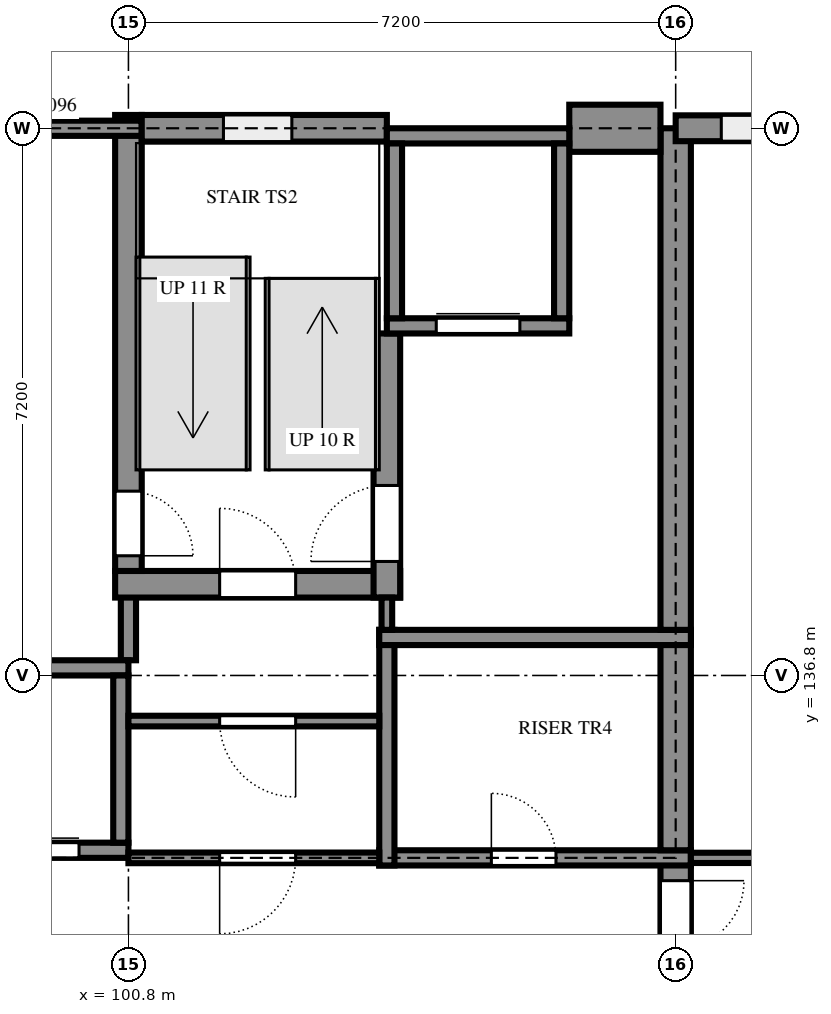
"""IFC4 building model, lengths in metres.
Left out: names, types, materials, properties, quantities, classifications, styles, units other than length and angle.
Written with IfcOpenShell. Run it as: python <this file> out.ifc"""

import sys

from ifc_helpers import new_model, si_unit, direction, frame, frame_2d, origin, place, context, subcontext, project, spatial, rectangle, extrude, element, fill, save


model = new_model("IFC4")
c1 = context("Model", 3, precision=1e-05, world=origin(), true_north=direction((0.0, 1.0)))
c2 = subcontext(c1, "Body", "Model", "MODEL_VIEW")
j1 = project(units=[si_unit("LENGTHUNIT", "METRE"), si_unit("PLANEANGLEUNIT", "RADIAN")], contexts=[c1])
p1 = place(None, origin())
s1 = spatial("IfcSite", under=j1, at=p1, CompositionType="ELEMENT")
p2 = place(p1, origin())
s2 = spatial("IfcBuilding", under=s1, at=p2, CompositionType="ELEMENT")
p3 = place(p2, frame((0.0, 0.0, 21.6)))
s3 = spatial("IfcBuildingStorey", under=s2, at=p3, CompositionType="ELEMENT", Elevation=21.6)
p4 = place(p3, frame((108.0, 132.0, 0.0), z_axis=(0.0, 0.0, 1.0), x_axis=(0.0, 1.0, 0.0)))
e1 = element("IfcWall", 1, at=p4, inside=s3, PredefinedType="SHEAR", context=c2, shape_type="SweptSolid", body=[
    extrude(rectangle(XDim=2.5, YDim=0.4, at=frame_2d((1.25, 0.0))), origin(), (0.0, 0.0, 1.0), 3.6),
])
p5 = place(p4, frame((0.3, 0.0, 0.0)))
e2 = element("IfcOpeningElement", 2, at=p5, cuts=e1, PredefinedType="OPENING", context=c2, shape_type="SweptSolid", body=[
    extrude(rectangle(XDim=1.8, YDim=2.1, at=frame_2d((0.9, 1.05))), frame((0.0, 0.21, 0.0), z_axis=(0.0, -1.0, 0.0), x_axis=(1.0, 0.0, 0.0)), (0.0, 0.0, 1.0), 0.42),
])
p6 = place(p3, frame((104.1, 134.4, 0.0), z_axis=(0.0, 0.0, 1.0), x_axis=(1.0, 0.0, 0.0)))
e3 = element("IfcWall", 3, at=p6, inside=s3, PredefinedType="SHEAR", context=c2, shape_type="SweptSolid", body=[
    extrude(rectangle(XDim=4.1, YDim=0.2, at=frame_2d((2.05, 0.0))), origin(), (0.0, 0.0, 1.0), 3.6),
])
p7 = place(p6, frame((1.475, 0.0, 0.0)))
e4 = element("IfcOpeningElement", 4, at=p7, cuts=e3, PredefinedType="OPENING", context=c2, shape_type="SweptSolid", body=[
    extrude(rectangle(XDim=0.85, YDim=2.1, at=frame_2d((0.425, 1.05))), frame((0.0, 0.11, 0.0), z_axis=(0.0, -1.0, 0.0), x_axis=(1.0, 0.0, 0.0)), (0.0, 0.0, 1.0), 0.22),
])
p8 = place(p3, frame((108.0, 134.5, 0.0), z_axis=(0.0, 0.0, 1.0), x_axis=(0.0, 1.0, 0.0)))
e5 = element("IfcWall", 5, at=p8, inside=s3, PredefinedType="SHEAR", context=c2, shape_type="SweptSolid", body=[
    extrude(rectangle(XDim=2.9, YDim=0.4, at=frame_2d((1.45, 0.0))), origin(), (0.0, 0.0, 1.0), 3.6),
])
p9 = place(p3, frame((100.8, 137.0, 0.0), z_axis=(0.0, 0.0, 1.0), x_axis=(0.0, 1.0, 0.0)))
e6 = element("IfcWall", 6, at=p9, inside=s3, PredefinedType="SHEAR", context=c2, shape_type="SweptSolid", body=[
    extrude(rectangle(XDim=1.175, YDim=0.2, at=frame_2d((0.587, 0.0))), origin(), (0.0, 0.0, 1.0), 3.6),
])
p10 = place(p3, frame((104.2, 137.4, 0.0), z_axis=(0.0, 0.0, 1.0), x_axis=(0.0, -1.0, 0.0)))
e7 = element("IfcWall", 7, at=p10, inside=s3, PredefinedType="SHEAR", context=c2, shape_type="SweptSolid", body=[
    extrude(rectangle(XDim=3.1, YDim=0.2, at=frame_2d((1.55, 0.0))), origin(), (0.0, 0.0, 1.0), 3.6),
])
p11 = place(p3, frame((108.2, 137.3, 0.0), z_axis=(0.0, 0.0, 1.0), x_axis=(-1.0, 0.0, 0.0)))
e8 = element("IfcWall", 8, at=p11, inside=s3, PredefinedType="SHEAR", context=c2, shape_type="SweptSolid", body=[
    extrude(rectangle(XDim=4.1, YDim=0.2, at=frame_2d((2.05, 0.0))), origin(), (0.0, 0.0, 1.0), 3.6),
])
p12 = place(p3, frame((108.0, 137.4, 0.0), z_axis=(0.0, 0.0, 1.0), x_axis=(0.0, 1.0, 0.0)))
e9 = element("IfcWall", 9, at=p12, inside=s3, PredefinedType="SHEAR", context=c2, shape_type="SweptSolid", body=[
    extrude(rectangle(XDim=6.6, YDim=0.4, at=frame_2d((3.3, 0.0))), origin(), (0.0, 0.0, 1.0), 3.6),
])
p13 = place(p3, frame((100.625, 138.0, 0.0), z_axis=(0.0, 0.0, 1.0), x_axis=(1.0, 0.0, 0.0)))
e10 = element("IfcWall", 10, at=p13, inside=s3, PredefinedType="SHEAR", context=c2, shape_type="SweptSolid", body=[
    extrude(rectangle(XDim=3.75, YDim=0.35, at=frame_2d((1.875, 0.0))), origin(), (0.0, 0.0, 1.0), 3.6),
])
p14 = place(p13, frame((1.375, 0.0, 0.0)))
e11 = element("IfcOpeningElement", 11, at=p14, cuts=e10, PredefinedType="OPENING", context=c2, shape_type="SweptSolid", body=[
    extrude(rectangle(XDim=1.0, YDim=2.1, at=frame_2d((0.5, 1.05))), frame((0.0, 0.185, 0.0), z_axis=(0.0, -1.0, 0.0), x_axis=(1.0, 0.0, 0.0)), (0.0, 0.0, 1.0), 0.37),
])
p15 = place(p3, frame((104.2, 137.825, 0.0), z_axis=(0.0, 0.0, 1.0), x_axis=(0.0, 1.0, 0.0)))
e12 = element("IfcWall", 12, at=p15, inside=s3, PredefinedType="SHEAR", context=c2, shape_type="SweptSolid", body=[
    extrude(rectangle(XDim=3.475, YDim=0.35, at=frame_2d((1.738, 0.0))), origin(), (0.0, 0.0, 1.0), 3.6),
])
p16 = place(p15, frame((0.475, 0.0, 0.0)))
e13 = element("IfcOpeningElement", 13, at=p16, cuts=e12, PredefinedType="OPENING", context=c2, shape_type="SweptSolid", body=[
    extrude(rectangle(XDim=1.0, YDim=2.1, at=frame_2d((0.5, 1.05))), frame((0.0, 0.185, 0.0), z_axis=(0.0, -1.0, 0.0), x_axis=(1.0, 0.0, 0.0)), (0.0, 0.0, 1.0), 0.37),
])
p17 = place(p3, frame((100.8, 144.175, 0.0), z_axis=(0.0, 0.0, 1.0), x_axis=(0.0, -1.0, 0.0)))
e14 = element("IfcWall", 14, at=p17, inside=s3, PredefinedType="SHEAR", context=c2, shape_type="SweptSolid", body=[
    extrude(rectangle(XDim=6.0, YDim=0.35, at=frame_2d((3.0, 0.0))), origin(), (0.0, 0.0, 1.0), 3.6),
])
p18 = place(p17, frame((4.95, 0.0, 0.0)))
e15 = element("IfcOpeningElement", 15, at=p18, cuts=e14, PredefinedType="OPENING", context=c2, shape_type="SweptSolid", body=[
    extrude(rectangle(XDim=0.85, YDim=2.1, at=frame_2d((0.425, 1.05))), frame((0.0, 0.185, 0.0), z_axis=(0.0, -1.0, 0.0), x_axis=(1.0, 0.0, 0.0)), (0.0, 0.0, 1.0), 0.37),
])
p19 = place(p3, frame((100.975, 144.0, 0.0), z_axis=(0.0, 0.0, 1.0), x_axis=(-1.0, 0.0, 0.0)))
e16 = element("IfcWall", 16, at=p19, inside=s3, PredefinedType="SHEAR", context=c2, shape_type="SweptSolid", body=[
    extrude(rectangle(XDim=7.575, YDim=0.2, at=frame_2d((3.788, 0.0))), origin(), (0.0, 0.0, 1.0), 3.6),
])
p20 = place(p3, frame((104.2, 144.0, 0.0), z_axis=(0.0, 0.0, 1.0), x_axis=(-1.0, 0.0, 0.0)))
e17 = element("IfcWall", 17, at=p20, inside=s3, PredefinedType="SHEAR", context=c2, shape_type="SweptSolid", body=[
    extrude(rectangle(XDim=3.225, YDim=0.35, at=frame_2d((1.612, 0.0))), origin(), (0.0, 0.0, 1.0), 3.6),
])
p21 = place(p20, frame((1.25, 0.0, 0.6)))
e18 = element("IfcOpeningElement", 18, at=p21, cuts=e17, PredefinedType="OPENING", context=c2, shape_type="SweptSolid", body=[
    extrude(rectangle(XDim=0.9, YDim=2.1, at=frame_2d((0.45, 1.05))), frame((0.0, 0.185, 0.0), z_axis=(0.0, -1.0, 0.0), x_axis=(1.0, 0.0, 0.0)), (0.0, 0.0, 1.0), 0.37),
])
p22 = place(p3, frame((115.046, 144.0, 0.0), z_axis=(0.0, 0.0, 1.0), x_axis=(-1.0, 0.0, 0.0)))
e19 = element("IfcWall", 19, at=p22, inside=s3, PredefinedType="SOLIDWALL", context=c2, shape_type="SweptSolid", body=[
    extrude(rectangle(XDim=7.046, YDim=0.34, at=frame_2d((3.523, 0.0))), origin(), (0.0, 0.0, 1.0), 3.16),
])
p23 = place(p22, frame((4.046, 0.0, 0.9)))
e20 = element("IfcOpeningElement", 20, at=p23, cuts=e19, PredefinedType="OPENING", context=c2, shape_type="SweptSolid", body=[
    extrude(rectangle(XDim=2.4, YDim=1.8, at=frame_2d((1.2, 0.9))), frame((0.0, 0.18, 0.0), z_axis=(0.0, -1.0, 0.0), x_axis=(1.0, 0.0, 0.0)), (0.0, 0.0, 1.0), 0.36),
])
p24 = place(p22, frame((0.447, 0.0, 0.9)))
e21 = element("IfcOpeningElement", 21, at=p24, cuts=e19, PredefinedType="OPENING", context=c2, shape_type="SweptSolid", body=[
    extrude(rectangle(XDim=2.4, YDim=1.8, at=frame_2d((1.2, 0.9))), frame((0.0, 0.18, 0.0), z_axis=(0.0, -1.0, 0.0), x_axis=(1.0, 0.0, 0.0)), (0.0, 0.0, 1.0), 0.36),
])
p25 = place(p3, frame((107.8, 144.0, 0.0), z_axis=(0.0, 0.0, 1.0), x_axis=(-1.0, 0.0, 0.0)))
e22 = element("IfcWall", 22, at=p25, inside=s3, PredefinedType="SOLIDWALL", context=c2, shape_type="SweptSolid", body=[
    extrude(rectangle(XDim=1.2, YDim=0.62, at=frame_2d((0.6, 0.0))), origin(), (0.0, 0.0, 1.0), 3.46),
])
p26 = place(p3, frame((98.4, 134.5, 0.0), z_axis=(0.0, 0.0, 1.0), x_axis=(1.0, 0.0, 0.0)))
e23 = element("IfcWall", 23, at=p26, inside=s3, PredefinedType="SHEAR", context=c2, shape_type="SweptSolid", body=[
    extrude(rectangle(XDim=2.4, YDim=0.2, at=frame_2d((1.2, 0.0))), origin(), (0.0, 0.0, 1.0), 3.6),
])
p27 = place(p26, frame((0.65, 0.0, 0.0)))
e24 = element("IfcOpeningElement", 24, at=p27, cuts=e23, PredefinedType="OPENING", context=c2, shape_type="SweptSolid", body=[
    extrude(rectangle(XDim=1.1, YDim=2.1, at=frame_2d((0.55, 1.05))), frame((0.0, 0.11, 0.0), z_axis=(0.0, -1.0, 0.0), x_axis=(1.0, 0.0, 0.0)), (0.0, 0.0, 1.0), 0.22),
])
p28 = place(p3, frame((98.4, 136.9, 0.0), z_axis=(0.0, 0.0, 1.0), x_axis=(1.0, 0.0, 0.0)))
e25 = element("IfcWall", 25, at=p28, inside=s3, PredefinedType="SHEAR", context=c2, shape_type="SweptSolid", body=[
    extrude(rectangle(XDim=2.4, YDim=0.2, at=frame_2d((1.2, 0.0))), origin(), (0.0, 0.0, 1.0), 3.6),
])
p29 = place(p3, frame((100.7, 134.6, 0.0), z_axis=(0.0, 0.0, 1.0), x_axis=(0.0, 1.0, 0.0)))
e26 = element("IfcWall", 26, at=p29, inside=s3, PredefinedType="SHEAR", context=c2, shape_type="SweptSolid", body=[
    extrude(rectangle(XDim=2.2, YDim=0.2, at=frame_2d((1.1, 0.0))), origin(), (0.0, 0.0, 1.0), 3.6),
])
p30 = place(p3, frame((104.2, 141.4, 0.0), z_axis=(0.0, 0.0, 1.0), x_axis=(1.0, 0.0, 0.0)))
e27 = element("IfcWall", 27, at=p30, inside=s3, PredefinedType="SHEAR", context=c2, shape_type="SweptSolid", body=[
    extrude(rectangle(XDim=2.4, YDim=0.2, at=frame_2d((1.2, 0.0))), origin(), (0.0, 0.0, 1.0), 3.6),
])
p31 = place(p30, frame((0.65, 0.0, 0.0)))
e28 = element("IfcOpeningElement", 28, at=p31, cuts=e27, PredefinedType="OPENING", context=c2, shape_type="SweptSolid", body=[
    extrude(rectangle(XDim=1.1, YDim=2.1, at=frame_2d((0.55, 1.05))), frame((0.0, 0.11, 0.0), z_axis=(0.0, -1.0, 0.0), x_axis=(1.0, 0.0, 0.0)), (0.0, 0.0, 1.0), 0.22),
])
p32 = place(p3, frame((104.2, 143.9, 0.0), z_axis=(0.0, 0.0, 1.0), x_axis=(1.0, 0.0, 0.0)))
e29 = element("IfcWall", 29, at=p32, inside=s3, PredefinedType="SHEAR", context=c2, shape_type="SweptSolid", body=[
    extrude(rectangle(XDim=2.4, YDim=0.2, at=frame_2d((1.2, 0.0))), origin(), (0.0, 0.0, 1.0), 3.6),
])
for number, where, z_axis, x_axis in (
    (30, (104.3, 141.5, 0.0), (0.0, 0.0, 1.0), (0.0, 1.0, 0.0)),
    (31, (106.5, 141.5, 0.0), (0.0, 0.0, 1.0), (0.0, 1.0, 0.0)),
):
    element("IfcWall", number, at=place(p3, frame(where, z_axis=z_axis, x_axis=x_axis)), inside=s3, PredefinedType="SHEAR", context=c2, shape_type="SweptSolid", body=[
        extrude(rectangle(XDim=2.3, YDim=0.2, at=frame_2d((1.15, 0.0))), origin(), (0.0, 0.0, 1.0), 3.6),
    ])
p33 = place(p3, frame((100.8, 134.4, 0.0), z_axis=(0.0, 0.0, 1.0), x_axis=(1.0, 0.0, 0.0)))
e32 = element("IfcWall", 32, at=p33, inside=s3, PredefinedType="PARTITIONING", context=c2, shape_type="SweptSolid", body=[
    extrude(rectangle(XDim=3.3, YDim=0.14, at=frame_2d((1.65, 0.0))), origin(), (0.0, 0.0, 1.0), 3.46),
])
p34 = place(p33, frame((1.2, 0.0, 0.0)))
e33 = element("IfcOpeningElement", 33, at=p34, cuts=e32, PredefinedType="OPENING", context=c2, shape_type="SweptSolid", body=[
    extrude(rectangle(XDim=1.0, YDim=2.1, at=frame_2d((0.5, 1.05))), frame((0.0, 0.08, 0.0), z_axis=(0.0, -1.0, 0.0), x_axis=(1.0, 0.0, 0.0)), (0.0, 0.0, 1.0), 0.16),
])
p35 = place(p3, frame((108.2, 134.4, 0.0), z_axis=(0.0, 0.0, 1.0), x_axis=(1.0, 0.0, 0.0)))
e34 = element("IfcWall", 34, at=p35, inside=s3, PredefinedType="PARTITIONING", context=c2, shape_type="SweptSolid", body=[
    extrude(rectangle(XDim=25.07, YDim=0.135, at=frame_2d((12.535, 0.0))), origin(), (0.0, 0.0, 1.0), 3.16),
])
p36 = place(p35, frame((22.7, 0.0, 0.0)))
e35 = element("IfcOpeningElement", 35, at=p36, cuts=e34, PredefinedType="OPENING", context=c2, shape_type="SweptSolid", body=[
    extrude(rectangle(XDim=1.0, YDim=2.4, at=frame_2d((0.5, 1.2))), frame((0.0, 0.077, 0.0), z_axis=(0.0, -1.0, 0.0), x_axis=(1.0, 0.0, 0.0)), (0.0, 0.0, 1.0), 0.155),
])
p37 = place(p3, frame((100.8, 136.2, 0.0), z_axis=(0.0, 0.0, 1.0), x_axis=(1.0, 0.0, 0.0)))
e36 = element("IfcWall", 36, at=p37, inside=s3, PredefinedType="PARTITIONING", context=c2, shape_type="SweptSolid", body=[
    extrude(rectangle(XDim=3.3, YDim=0.14, at=frame_2d((1.65, 0.0))), origin(), (0.0, 0.0, 1.0), 3.46),
])
p38 = place(p37, frame((1.2, 0.0, 0.0)))
e37 = element("IfcOpeningElement", 37, at=p38, cuts=e36, PredefinedType="OPENING", context=c2, shape_type="SweptSolid", body=[
    extrude(rectangle(XDim=1.0, YDim=2.1, at=frame_2d((0.5, 1.05))), frame((0.0, 0.08, 0.0), z_axis=(0.0, -1.0, 0.0), x_axis=(1.0, 0.0, 0.0)), (0.0, 0.0, 1.0), 0.16),
])
p39 = place(p3, frame((104.2, 137.4, 0.0), z_axis=(0.0, 0.0, 1.0), x_axis=(0.0, 1.0, 0.0)))
e38 = element("IfcWall", 38, at=p39, inside=s3, PredefinedType="PARTITIONING", context=c2, shape_type="SweptSolid", body=[
    extrude(rectangle(XDim=0.425, YDim=0.14, at=frame_2d((0.212, 0.0))), origin(), (0.0, 0.0, 1.0), 3.46),
])
p40 = place(p23, origin())
e39 = element("IfcWindow", 39, at=p40, inside=s3, PartitioningType="SINGLE_PANEL", PredefinedType="WINDOW", context=c2, shape_type="SweptSolid", body=[
    extrude(rectangle(XDim=2.4, YDim=1.8, at=frame_2d((1.2, 0.9))), frame((0.0, 0.03, 0.0), z_axis=(0.0, -1.0, 0.0), x_axis=(1.0, 0.0, 0.0)), (0.0, 0.0, 1.0), 0.06),
])
fill(e20, e39)
p41 = place(p21, origin())
e40 = element("IfcWindow", 40, at=p41, inside=s3, PartitioningType="SINGLE_PANEL", PredefinedType="WINDOW", context=c2, shape_type="SweptSolid", body=[
    extrude(rectangle(XDim=0.9, YDim=2.1, at=frame_2d((0.45, 1.05))), frame((0.0, 0.03, 0.0), z_axis=(0.0, -1.0, 0.0), x_axis=(1.0, 0.0, 0.0)), (0.0, 0.0, 1.0), 0.06),
])
fill(e18, e40)
p42 = place(p27, origin())
e41 = element("IfcDoor", 41, at=p42, inside=s3, OperationType="SLIDING_TO_LEFT", PredefinedType="DOOR", context=c2, shape_type="SweptSolid", body=[
    extrude(rectangle(XDim=1.1, YDim=2.1, at=frame_2d((0.55, 1.05))), frame((0.0, 0.025, 0.0), z_axis=(0.0, -1.0, 0.0), x_axis=(1.0, 0.0, 0.0)), (0.0, 0.0, 1.0), 0.05),
])
fill(e24, e41)
p43 = place(p31, origin())
e42 = element("IfcDoor", 42, at=p43, inside=s3, OperationType="SLIDING_TO_LEFT", PredefinedType="DOOR", context=c2, shape_type="SweptSolid", body=[
    extrude(rectangle(XDim=1.1, YDim=2.1, at=frame_2d((0.55, 1.05))), frame((0.0, 0.025, 0.0), z_axis=(0.0, -1.0, 0.0), x_axis=(1.0, 0.0, 0.0)), (0.0, 0.0, 1.0), 0.05),
])
fill(e28, e42)
p44 = place(p34, frame((1.0, 0.0, 0.0), z_axis=(0.0, 0.0, 1.0), x_axis=(-1.0, 0.0, 0.0)))
e43 = element("IfcDoor", 43, at=p44, inside=s3, OperationType="SINGLE_SWING_LEFT", PredefinedType="DOOR", context=c2, shape_type="SweptSolid", body=[
    extrude(rectangle(XDim=1.0, YDim=2.1, at=frame_2d((0.5, 1.05))), frame((0.0, 0.025, 0.0), z_axis=(0.0, -1.0, 0.0), x_axis=(1.0, 0.0, 0.0)), (0.0, 0.0, 1.0), 0.05),
])
fill(e33, e43)
p45 = place(p38, frame((1.0, 0.0, 0.0), z_axis=(0.0, 0.0, 1.0), x_axis=(-1.0, 0.0, 0.0)))
e44 = element("IfcDoor", 44, at=p45, inside=s3, OperationType="SINGLE_SWING_RIGHT", PredefinedType="DOOR", context=c2, shape_type="SweptSolid", body=[
    extrude(rectangle(XDim=1.0, YDim=2.1, at=frame_2d((0.5, 1.05))), frame((0.0, 0.025, 0.0), z_axis=(0.0, -1.0, 0.0), x_axis=(1.0, 0.0, 0.0)), (0.0, 0.0, 1.0), 0.05),
])
fill(e37, e44)
p46 = place(p7, origin())
e45 = element("IfcDoor", 45, at=p46, inside=s3, OperationType="SINGLE_SWING_RIGHT", PredefinedType="DOOR", context=c2, shape_type="SweptSolid", body=[
    extrude(rectangle(XDim=0.85, YDim=2.1, at=frame_2d((0.425, 1.05))), frame((0.0, 0.025, 0.0), z_axis=(0.0, -1.0, 0.0), x_axis=(1.0, 0.0, 0.0)), (0.0, 0.0, 1.0), 0.05),
])
fill(e4, e45)
p47 = place(p14, origin())
e46 = element("IfcDoor", 46, at=p47, inside=s3, OperationType="SINGLE_SWING_RIGHT", PredefinedType="DOOR", context=c2, shape_type="SweptSolid", body=[
    extrude(rectangle(XDim=1.0, YDim=2.1, at=frame_2d((0.5, 1.05))), frame((0.0, 0.025, 0.0), z_axis=(0.0, -1.0, 0.0), x_axis=(1.0, 0.0, 0.0)), (0.0, 0.0, 1.0), 0.05),
])
fill(e11, e46)
p48 = place(p18, origin())
e47 = element("IfcDoor", 47, at=p48, inside=s3, OperationType="SINGLE_SWING_LEFT", PredefinedType="DOOR", context=c2, shape_type="SweptSolid", body=[
    extrude(rectangle(XDim=0.85, YDim=2.1, at=frame_2d((0.425, 1.05))), frame((0.0, 0.025, 0.0), z_axis=(0.0, -1.0, 0.0), x_axis=(1.0, 0.0, 0.0)), (0.0, 0.0, 1.0), 0.05),
])
fill(e15, e47)
p49 = place(p16, origin())
e48 = element("IfcDoor", 48, at=p49, inside=s3, OperationType="SINGLE_SWING_RIGHT", PredefinedType="DOOR", context=c2, shape_type="SweptSolid", body=[
    extrude(rectangle(XDim=1.0, YDim=2.1, at=frame_2d((0.5, 1.05))), frame((0.0, 0.025, 0.0), z_axis=(0.0, -1.0, 0.0), x_axis=(1.0, 0.0, 0.0)), (0.0, 0.0, 1.0), 0.05),
])
fill(e13, e48)
p50 = place(p5, frame((1.8, 0.0, 0.0), z_axis=(0.0, 0.0, 1.0), x_axis=(-1.0, 0.0, 0.0)))
e49 = element("IfcDoor", 49, at=p50, inside=s3, OperationType="DOUBLE_DOOR_SINGLE_SWING", PredefinedType="DOOR", context=c2, shape_type="SweptSolid", body=[
    extrude(rectangle(XDim=1.8, YDim=2.1, at=frame_2d((0.9, 1.05))), frame((0.0, 0.025, 0.0), z_axis=(0.0, -1.0, 0.0), x_axis=(1.0, 0.0, 0.0)), (0.0, 0.0, 1.0), 0.05),
])
fill(e2, e49)
save(model, sys.argv[1])
